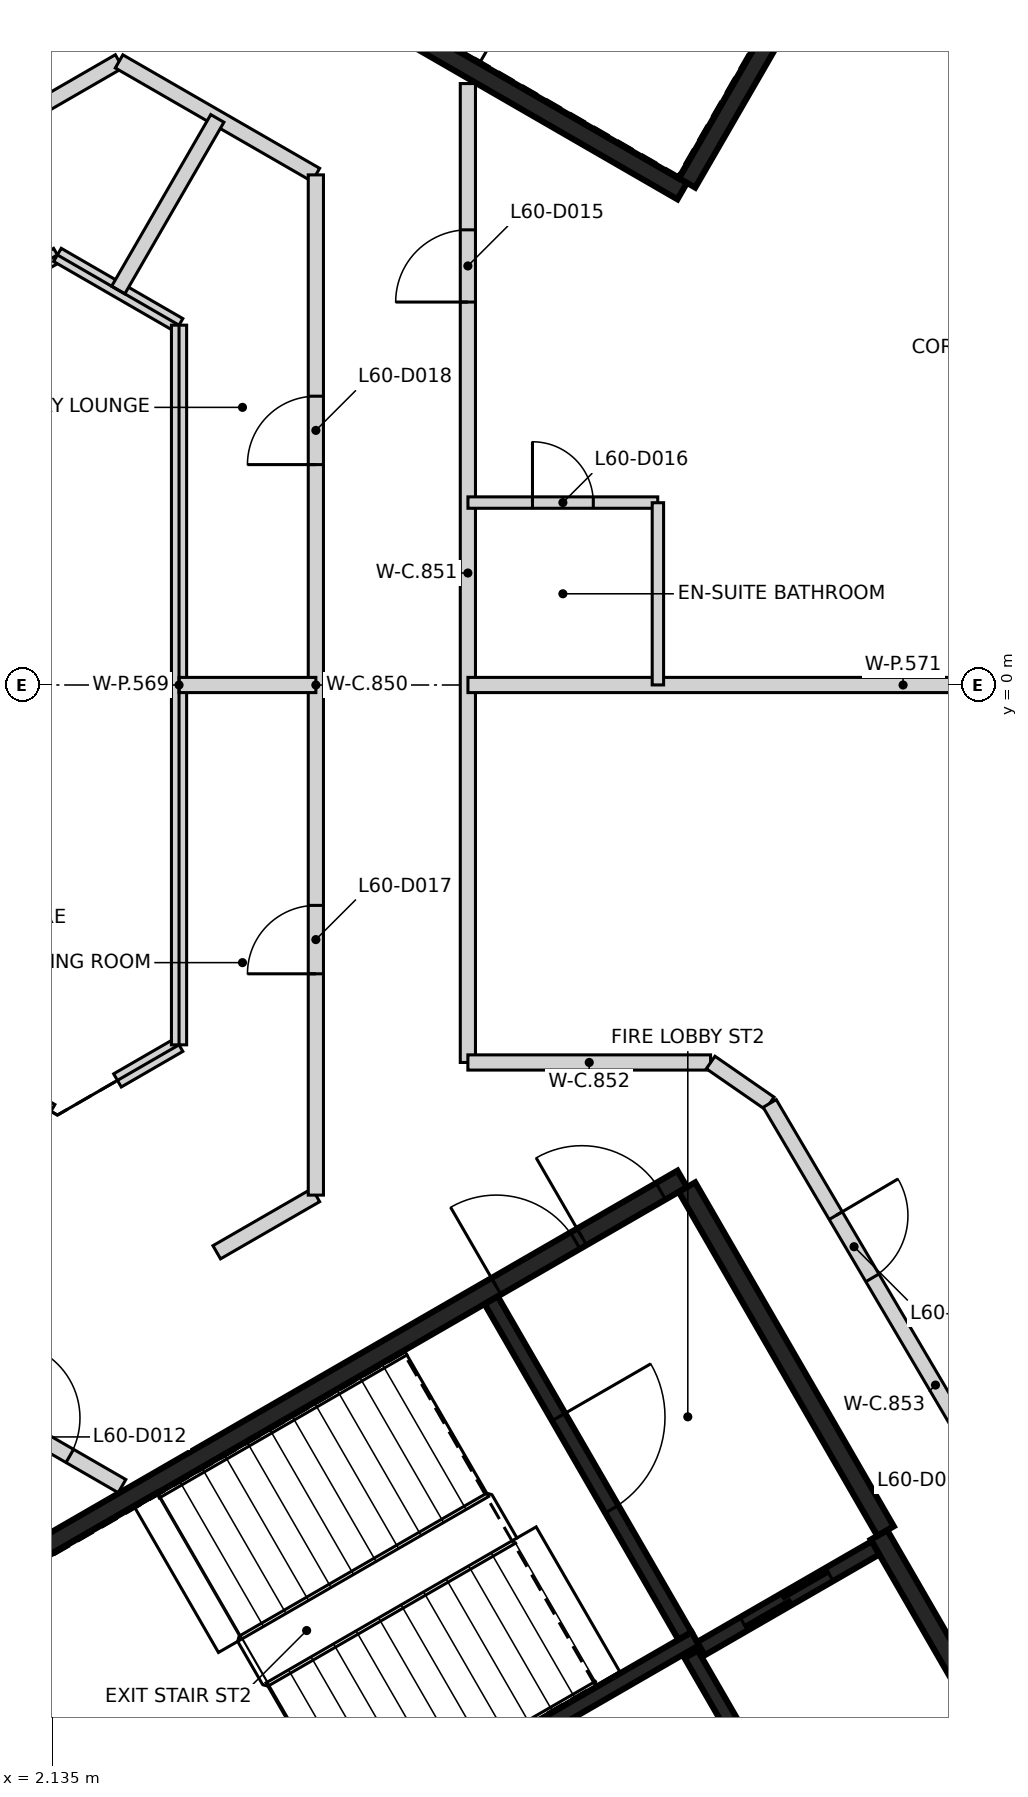
"""IFC4 building model, lengths in metres.
Left out: names, types, materials, properties, quantities, classifications, styles, units other than length and angle.
Written with IfcOpenShell. Run it as: python <this file> out.ifc"""

import sys

from ifc_helpers import new_model, si_unit, direction, frame, frame_2d, origin, place, context, subcontext, project, spatial, rectangle, extrude, element, fill, save


model = new_model("IFC4")
c1 = context("Model", 3, precision=1e-05, world=origin(), true_north=direction((0.0, 1.0)))
c2 = subcontext(c1, "Body", "Model", "MODEL_VIEW")
j1 = project(units=[si_unit("LENGTHUNIT", "METRE"), si_unit("PLANEANGLEUNIT", "RADIAN")], contexts=[c1])
p1 = place(None, origin())
s1 = spatial("IfcSite", under=j1, at=p1, CompositionType="ELEMENT")
p2 = place(p1, origin())
s2 = spatial("IfcBuilding", under=s1, at=p2, CompositionType="ELEMENT")
p3 = place(p2, frame((0.0, 0.0, 239.4)))
s3 = spatial("IfcBuildingStorey", under=s2, at=p3, CompositionType="ELEMENT", Elevation=239.4)
p4 = place(p3, frame((10.42, 6.498, 0.0), z_axis=(0.0, 0.0, 1.0), x_axis=(-0.866021906294, 0.500006057782, 0.0)))
e1 = element("IfcWall", 1, at=p4, inside=s3, PredefinedType="SHEAR", context=c2, shape_type="SweptSolid", body=[
    extrude(rectangle(XDim=11.55, YDim=0.25, at=frame_2d((5.775, 0.0))), origin(), (0.0, 0.0, 1.0), 3.25),
])
p5 = place(p4, frame((10.025, 0.0, 0.0)))
e2 = element("IfcOpeningElement", 2, at=p5, cuts=e1, PredefinedType="OPENING", context=c2, shape_type="SweptSolid", body=[
    extrude(rectangle(XDim=1.2, YDim=2.1, at=frame_2d((0.6, 1.05))), frame((0.0, 0.135, 0.0), z_axis=(0.0, -1.0, 0.0), x_axis=(1.0, 0.0, 0.0)), (0.0, 0.0, 1.0), 0.27),
])
p6 = place(p4, frame((8.725, 0.0, 0.0)))
e3 = element("IfcOpeningElement", 3, at=p6, cuts=e1, PredefinedType="OPENING", context=c2, shape_type="SweptSolid", body=[
    extrude(rectangle(XDim=1.2, YDim=2.1, at=frame_2d((0.6, 1.05))), frame((0.0, 0.135, 0.0), z_axis=(0.0, -1.0, 0.0), x_axis=(1.0, 0.0, 0.0)), (0.0, 0.0, 1.0), 0.27),
])
p7 = place(p3, frame((13.238, 11.378, 0.0), z_axis=(0.0, 0.0, 1.0), x_axis=(-0.500008851346, -0.866020293397, 0.0)))
e4 = element("IfcWall", 4, at=p7, inside=s3, PredefinedType="SHEAR", context=c2, shape_type="SweptSolid", body=[
    extrude(rectangle(XDim=5.51, YDim=0.25, at=frame_2d((2.755, 0.0))), origin(), (0.0, 0.0, 1.0), 3.25),
])
p8 = place(p3, frame((0.417, -12.273, 0.0), z_axis=(0.0, 0.0, 1.0), x_axis=(0.866021906294, 0.500006057782, 0.0)))
e5 = element("IfcWall", 5, at=p8, inside=s3, PredefinedType="SHEAR", context=c2, shape_type="SweptSolid", body=[
    extrude(rectangle(XDim=11.55, YDim=0.25, at=frame_2d((5.775, 0.0))), origin(), (0.0, 0.0, 1.0), 3.25),
])
p9 = place(p8, frame((10.025, 0.0, 0.0)))
e6 = element("IfcOpeningElement", 6, at=p9, cuts=e5, PredefinedType="OPENING", context=c2, shape_type="SweptSolid", body=[
    extrude(rectangle(XDim=1.2, YDim=2.1, at=frame_2d((0.6, 1.05))), frame((0.0, 0.135, 0.0), z_axis=(0.0, -1.0, 0.0), x_axis=(1.0, 0.0, 0.0)), (0.0, 0.0, 1.0), 0.27),
])
p10 = place(p8, frame((8.725, 0.0, 0.0)))
e7 = element("IfcOpeningElement", 7, at=p10, cuts=e5, PredefinedType="OPENING", context=c2, shape_type="SweptSolid", body=[
    extrude(rectangle(XDim=1.2, YDim=2.1, at=frame_2d((0.6, 1.05))), frame((0.0, 0.135, 0.0), z_axis=(0.0, -1.0, 0.0), x_axis=(1.0, 0.0, 0.0)), (0.0, 0.0, 1.0), 0.27),
])
p11 = place(p3, frame((13.008, -11.181, 0.0), z_axis=(0.0, 0.0, 1.0), x_axis=(0.500001955336, -0.866024274868, 0.0)))
e8 = element("IfcWall", 8, at=p11, inside=s3, PredefinedType="SHEAR", context=c2, shape_type="SweptSolid", body=[
    extrude(rectangle(XDim=6.125, YDim=0.25, at=frame_2d((3.062, 0.0))), origin(), (0.0, 0.0, 1.0), 3.25),
])
p12 = place(p11, frame((3.563, 0.0, 0.0)))
e9 = element("IfcOpeningElement", 9, at=p12, cuts=e8, PredefinedType="OPENING", context=c2, shape_type="SweptSolid", body=[
    extrude(rectangle(XDim=1.0, YDim=2.1, at=frame_2d((0.5, 1.05))), frame((0.0, 0.135, 0.0), z_axis=(0.0, -1.0, 0.0), x_axis=(1.0, 0.0, 0.0)), (0.0, 0.0, 1.0), 0.27),
])
p13 = place(p3, frame((3.235, -17.153, 0.0), z_axis=(0.0, 0.0, 1.0), x_axis=(-0.500008851346, 0.866020293397, 0.0)))
e10 = element("IfcWall", 10, at=p13, inside=s3, PredefinedType="SHEAR", context=c2, shape_type="SweptSolid", body=[
    extrude(rectangle(XDim=5.51, YDim=0.25, at=frame_2d((2.755, 0.0))), origin(), (0.0, 0.0, 1.0), 3.25),
])
p14 = place(p3, frame((10.483, -6.606, 0.0), z_axis=(0.0, 0.0, 1.0), x_axis=(0.49999885962, -0.866026062182, 0.0)))
e11 = element("IfcWall", 11, at=p14, inside=s3, PredefinedType="SHEAR", context=c2, shape_type="SweptSolid", body=[
    extrude(rectangle(XDim=5.225, YDim=0.25, at=frame_2d((2.612, 0.0))), origin(), (0.0, 0.0, 1.0), 3.25),
])
p15 = place(p3, frame((5.419, -15.534, 0.0), z_axis=(0.0, 0.0, 1.0), x_axis=(0.866029065029, 0.499993658486, 0.0)))
e12 = element("IfcWall", 12, at=p15, inside=s3, PredefinedType="SHEAR", context=c2, shape_type="SweptSolid", body=[
    extrude(rectangle(XDim=5.974, YDim=0.2, at=frame_2d((2.987, 0.0))), origin(), (0.0, 0.0, 1.0), 3.25),
])
p16 = place(p3, frame((7.906, -8.094, 0.0), z_axis=(0.0, 0.0, 1.0), x_axis=(0.500027839223, -0.866009330205, 0.0)))
e13 = element("IfcWall", 13, at=p16, inside=s3, PredefinedType="SHEAR", context=c2, shape_type="SweptSolid", body=[
    extrude(rectangle(XDim=5.098, YDim=0.2, at=frame_2d((2.549, 0.0))), origin(), (0.0, 0.0, 1.0), 3.25),
])
p17 = place(p16, frame((1.774, 0.0, 0.0)))
e14 = element("IfcOpeningElement", 14, at=p17, cuts=e13, PredefinedType="OPENING", context=c2, shape_type="SweptSolid", body=[
    extrude(rectangle(XDim=1.4, YDim=2.1, at=frame_2d((0.7, 1.05))), frame((0.0, 0.11, 0.0), z_axis=(0.0, -1.0, 0.0), x_axis=(1.0, 0.0, 0.0)), (0.0, 0.0, 1.0), 0.22),
])
p18 = place(p3, frame((12.088, -15.437, 0.0), z_axis=(0.0, 0.0, 1.0), x_axis=(-0.500026960575, 0.86600983753, 0.0)))
e15 = element("IfcWall", 15, at=p18, inside=s3, PredefinedType="SHEAR", context=c2, shape_type="SweptSolid", body=[
    extrude(rectangle(XDim=3.1, YDim=0.2, at=frame_2d((1.55, 0.0))), origin(), (0.0, 0.0, 1.0), 3.25),
])
p19 = place(p3, frame((10.666, -12.678, 0.0), z_axis=(0.0, 0.0, 1.0), x_axis=(0.866018407898, 0.500012117035, 0.0)))
e16 = element("IfcWall", 16, at=p19, inside=s3, PredefinedType="SHEAR", context=c2, shape_type="SweptSolid", body=[
    extrude(rectangle(XDim=2.651, YDim=0.2, at=frame_2d((1.325, 0.0))), origin(), (0.0, 0.0, 1.0), 3.25),
])
p20 = place(p19, frame((0.652, 0.0, 0.0)))
e17 = element("IfcOpeningElement", 17, at=p20, cuts=e16, PredefinedType="OPENING", context=c2, shape_type="SweptSolid", body=[
    extrude(rectangle(XDim=1.3, YDim=2.1, at=frame_2d((0.65, 1.05))), frame((0.0, 0.11, 0.0), z_axis=(0.0, -1.0, 0.0), x_axis=(1.0, 0.0, 0.0)), (0.0, 0.0, 1.0), 0.22),
])
p21 = place(p3, frame((-8.612, 1.494, 0.0), z_axis=(0.0, 0.0, 1.0), x_axis=(0.8660441356, 0.49996755414, 0.0)))
e18 = element("IfcWall", 18, at=p21, inside=s3, PredefinedType="PARTITIONING", context=c2, shape_type="SweptSolid", body=[
    extrude(rectangle(XDim=13.422, YDim=0.2, at=frame_2d((6.711, 0.0))), origin(), (0.0, 0.0, 1.0), 3.25),
])
p22 = place(p21, frame((9.611, 0.0, 0.0)))
e19 = element("IfcOpeningElement", 19, at=p22, cuts=e18, PredefinedType="OPENING", context=c2, shape_type="SweptSolid", body=[
    extrude(rectangle(XDim=0.9, YDim=2.1, at=frame_2d((0.45, 1.05))), frame((0.0, 0.11, 0.0), z_axis=(0.0, -1.0, 0.0), x_axis=(1.0, 0.0, 0.0)), (0.0, 0.0, 1.0), 0.22),
])
p23 = place(p21, frame((2.911, 0.0, 0.0)))
e20 = element("IfcOpeningElement", 20, at=p23, cuts=e18, PredefinedType="OPENING", context=c2, shape_type="SweptSolid", body=[
    extrude(rectangle(XDim=0.9, YDim=2.1, at=frame_2d((0.45, 1.05))), frame((0.0, 0.11, 0.0), z_axis=(0.0, -1.0, 0.0), x_axis=(1.0, 0.0, 0.0)), (0.0, 0.0, 1.0), 0.22),
])
p24 = place(p3, frame((-8.153, -4.069, 0.0), z_axis=(0.0, 0.0, 1.0), x_axis=(0.865955522833, -0.500121017829, 0.0)))
e21 = element("IfcWall", 21, at=p24, inside=s3, PredefinedType="PARTITIONING", context=c2, shape_type="SweptSolid", body=[
    extrude(rectangle(XDim=12.937, YDim=0.2, at=frame_2d((6.469, 0.0))), origin(), (0.0, 0.0, 1.0), 3.25),
])
p25 = place(p24, frame((3.337, 0.0, 0.0)))
e22 = element("IfcOpeningElement", 22, at=p25, cuts=e21, PredefinedType="OPENING", context=c2, shape_type="SweptSolid", body=[
    extrude(rectangle(XDim=1.0, YDim=2.1, at=frame_2d((0.5, 1.05))), frame((0.0, 0.11, 0.0), z_axis=(0.0, -1.0, 0.0), x_axis=(1.0, 0.0, 0.0)), (0.0, 0.0, 1.0), 0.22),
])
p26 = place(p24, frame((9.153, 0.0, 0.0)))
e23 = element("IfcOpeningElement", 23, at=p26, cuts=e21, PredefinedType="OPENING", context=c2, shape_type="SweptSolid", body=[
    extrude(rectangle(XDim=0.95, YDim=2.1, at=frame_2d((0.475, 1.05))), frame((0.0, 0.11, 0.0), z_axis=(0.0, -1.0, 0.0), x_axis=(1.0, 0.0, 0.0)), (0.0, 0.0, 1.0), 0.22),
])
p27 = place(p24, frame((11.144, 0.0, 0.0)))
e24 = element("IfcOpeningElement", 24, at=p27, cuts=e21, PredefinedType="OPENING", context=c2, shape_type="SweptSolid", body=[
    extrude(rectangle(XDim=1.0, YDim=2.1, at=frame_2d((0.5, 1.05))), frame((0.0, 0.11, 0.0), z_axis=(0.0, -1.0, 0.0), x_axis=(1.0, 0.0, 0.0)), (0.0, 0.0, 1.0), 0.22),
])
p28 = place(p3, frame((3.011, 8.204, 0.0), z_axis=(0.0, 0.0, 1.0), x_axis=(0.86628077395, -0.499557424812, 0.0)))
e25 = element("IfcWall", 25, at=p28, inside=s3, PredefinedType="PARTITIONING", context=c2, shape_type="SweptSolid", body=[
    extrude(rectangle(XDim=2.989, YDim=0.2, at=frame_2d((1.494, 0.0))), origin(), (0.0, 0.0, 1.0), 3.25),
])
p29 = place(p3, frame((4.296, -7.463, 0.0), z_axis=(0.0, 0.0, 1.0), x_axis=(0.86632054743, 0.499488447414, 0.0)))
e26 = element("IfcWall", 26, at=p29, inside=s3, PredefinedType="PARTITIONING", context=c2, shape_type="SweptSolid", body=[
    extrude(rectangle(XDim=1.505, YDim=0.2, at=frame_2d((0.753, 0.0))), origin(), (0.0, 0.0, 1.0), 3.25),
])
p30 = place(p3, frame((5.6, -6.711, 0.0), z_axis=(0.0, 0.0, 1.0), x_axis=(0.0, 1.0, 0.0)))
e27 = element("IfcWall", 27, at=p30, inside=s3, PredefinedType="PARTITIONING", context=c2, shape_type="SweptSolid", body=[
    extrude(rectangle(XDim=13.422, YDim=0.2, at=frame_2d((6.711, 0.0))), origin(), (0.0, 0.0, 1.0), 3.25),
])
p31 = place(p30, frame((2.912, 0.0, 0.0)))
e28 = element("IfcOpeningElement", 28, at=p31, cuts=e27, PredefinedType="OPENING", context=c2, shape_type="SweptSolid", body=[
    extrude(rectangle(XDim=0.9, YDim=2.1, at=frame_2d((0.45, 1.05))), frame((0.0, 0.11, 0.0), z_axis=(0.0, -1.0, 0.0), x_axis=(1.0, 0.0, 0.0)), (0.0, 0.0, 1.0), 0.22),
])
p32 = place(p30, frame((9.611, 0.0, 0.0)))
e29 = element("IfcOpeningElement", 29, at=p32, cuts=e27, PredefinedType="OPENING", context=c2, shape_type="SweptSolid", body=[
    extrude(rectangle(XDim=0.9, YDim=2.1, at=frame_2d((0.45, 1.05))), frame((0.0, 0.11, 0.0), z_axis=(0.0, -1.0, 0.0), x_axis=(1.0, 0.0, 0.0)), (0.0, 0.0, 1.0), 0.22),
])
p33 = place(p3, frame((7.6, -4.966, 0.0), z_axis=(0.0, 0.0, 1.0), x_axis=(0.0, 1.0, 0.0)))
e30 = element("IfcWall", 30, at=p33, inside=s3, PredefinedType="PARTITIONING", context=c2, shape_type="SweptSolid", body=[
    extrude(rectangle(XDim=12.878, YDim=0.2, at=frame_2d((6.439, 0.0))), origin(), (0.0, 0.0, 1.0), 3.25),
])
p34 = place(p33, frame((10.004, 0.0, 0.0)))
e31 = element("IfcOpeningElement", 31, at=p34, cuts=e30, PredefinedType="OPENING", context=c2, shape_type="SweptSolid", body=[
    extrude(rectangle(XDim=0.95, YDim=2.1, at=frame_2d((0.475, 1.05))), frame((0.0, 0.11, 0.0), z_axis=(0.0, -1.0, 0.0), x_axis=(1.0, 0.0, 0.0)), (0.0, 0.0, 1.0), 0.22),
])
p35 = place(p3, frame((7.6, -4.966, 0.0), z_axis=(0.0, 0.0, 1.0), x_axis=(1.0, 0.0, 0.0)))
e32 = element("IfcWall", 32, at=p35, inside=s3, PredefinedType="PARTITIONING", context=c2, shape_type="SweptSolid", body=[
    extrude(rectangle(XDim=3.193, YDim=0.2, at=frame_2d((1.596, 0.0))), origin(), (0.0, 0.0, 1.0), 3.25),
])
p36 = place(p3, frame((10.794, -4.966, 0.0), z_axis=(0.0, 0.0, 1.0), x_axis=(0.822266583859, -0.569102508401, 0.0)))
e33 = element("IfcWall", 33, at=p36, inside=s3, PredefinedType="PARTITIONING", context=c2, shape_type="SweptSolid", body=[
    extrude(rectangle(XDim=0.945, YDim=0.2, at=frame_2d((0.473, 0.0))), origin(), (0.0, 0.0, 1.0), 3.25),
])
p37 = place(p3, frame((11.571, -5.505, 0.0), z_axis=(0.0, 0.0, 1.0), x_axis=(0.507291838928, -0.861774326699, 0.0)))
e34 = element("IfcWall", 34, at=p37, inside=s3, PredefinedType="PARTITIONING", context=c2, shape_type="SweptSolid", body=[
    extrude(rectangle(XDim=8.599, YDim=0.2, at=frame_2d((4.299, 0.0))), origin(), (0.0, 0.0, 1.0), 3.25),
])
p38 = place(p37, frame((1.712, 0.0, 0.0)))
e35 = element("IfcOpeningElement", 35, at=p38, cuts=e34, PredefinedType="OPENING", context=c2, shape_type="SweptSolid", body=[
    extrude(rectangle(XDim=0.95, YDim=2.1, at=frame_2d((0.475, 1.05))), frame((0.0, 0.11, 0.0), z_axis=(0.0, -1.0, 0.0), x_axis=(1.0, 0.0, 0.0)), (0.0, 0.0, 1.0), 0.22),
])
p39 = place(p3, frame((-6.0, -0.924, 0.0), z_axis=(0.0, 0.0, 1.0), x_axis=(0.866223755075, -0.499656288007, 0.0)))
e36 = element("IfcWall", 36, at=p39, inside=s3, PredefinedType="PARTITIONING", context=c2, shape_type="SweptSolid", body=[
    extrude(rectangle(XDim=9.37, YDim=0.2, at=frame_2d((4.685, 0.0))), origin(), (0.0, 0.0, 1.0), 3.25),
])
p40 = place(p3, frame((-6.0, 0.924, 0.0), z_axis=(0.0, 0.0, 1.0), x_axis=(0.866012967051, 0.500021540435, 0.0)))
e37 = element("IfcWall", 37, at=p40, inside=s3, PredefinedType="PARTITIONING", context=c2, shape_type="SweptSolid", body=[
    extrude(rectangle(XDim=9.468, YDim=0.2, at=frame_2d((4.734, 0.0))), origin(), (0.0, 0.0, 1.0), 3.25),
])
p41 = place(p3, frame((2.2, 5.658, 0.0), z_axis=(0.0, 0.0, 1.0), x_axis=(0.865818011038, -0.500359042851, 0.0)))
e38 = element("IfcWall", 38, at=p41, inside=s3, PredefinedType="PARTITIONING", context=c2, shape_type="SweptSolid", body=[
    extrude(rectangle(XDim=1.848, YDim=0.2, at=frame_2d((0.924, 0.0))), origin(), (0.0, 0.0, 1.0), 3.25),
])
p42 = place(p3, frame((2.99, -5.202, 0.0), z_axis=(0.0, 0.0, 1.0), x_axis=(0.865872609263, 0.500264554538, 0.0)))
e39 = element("IfcWall", 39, at=p42, inside=s3, PredefinedType="PARTITIONING", context=c2, shape_type="SweptSolid", body=[
    extrude(rectangle(XDim=0.936, YDim=0.2, at=frame_2d((0.468, 0.0))), origin(), (0.0, 0.0, 1.0), 3.25),
])
p43 = place(p3, frame((3.0, 5.196, 0.0), z_axis=(0.0, 0.0, 1.0), x_axis=(0.500076354988, 0.865981315724, 0.0)))
e40 = element("IfcWall", 40, at=p43, inside=s3, PredefinedType="PARTITIONING", context=c2, shape_type="SweptSolid", body=[
    extrude(rectangle(XDim=2.607, YDim=0.2, at=frame_2d((1.304, 0.0))), origin(), (0.0, 0.0, 1.0), 3.25),
])
p44 = place(p3, frame((3.8, -4.734, 0.0), z_axis=(0.0, 0.0, 1.0), x_axis=(0.0, 1.0, 0.0)))
e41 = element("IfcWall", 41, at=p44, inside=s3, PredefinedType="PARTITIONING", context=c2, shape_type="SweptSolid", body=[
    extrude(rectangle(XDim=9.468, YDim=0.2, at=frame_2d((4.734, 0.0))), origin(), (0.0, 0.0, 1.0), 3.25),
])
p45 = place(p3, frame((3.8, 0.0, 0.0), z_axis=(0.0, 0.0, 1.0), x_axis=(1.0, 0.0, 0.0)))
e42 = element("IfcWall", 42, at=p45, inside=s3, PredefinedType="PARTITIONING", context=c2, shape_type="SweptSolid", body=[
    extrude(rectangle(XDim=1.8, YDim=0.2, at=frame_2d((0.9, 0.0))), origin(), (0.0, 0.0, 1.0), 3.25),
])
p46 = place(p3, frame((7.601, 0.0, 0.0), z_axis=(0.0, 0.0, 1.0), x_axis=(1.0, 0.0, 0.0)))
e43 = element("IfcWall", 43, at=p46, inside=s3, PredefinedType="PARTITIONING", context=c2, shape_type="SweptSolid", body=[
    extrude(rectangle(XDim=11.449, YDim=0.2, at=frame_2d((5.725, 0.0))), origin(), (0.0, 0.0, 1.0), 3.25),
])
p47 = place(p3, frame((7.601, 2.4, 0.0), z_axis=(0.0, 0.0, 1.0), x_axis=(1.0, 0.0, 0.0)))
e44 = element("IfcWall", 44, at=p47, inside=s3, PredefinedType="PARTITIONING", context=c2, shape_type="SweptSolid", body=[
    extrude(rectangle(XDim=2.497, YDim=0.15, at=frame_2d((1.249, 0.0))), origin(), (0.0, 0.0, 1.0), 3.25),
])
p48 = place(p47, frame((0.849, 0.0, 0.0)))
e45 = element("IfcOpeningElement", 45, at=p48, cuts=e44, PredefinedType="OPENING", context=c2, shape_type="SweptSolid", body=[
    extrude(rectangle(XDim=0.8, YDim=2.1, at=frame_2d((0.4, 1.05))), frame((0.0, 0.085, 0.0), z_axis=(0.0, -1.0, 0.0), x_axis=(1.0, 0.0, 0.0)), (0.0, 0.0, 1.0), 0.17),
])
p49 = place(p3, frame((10.1, 0.001, 0.0), z_axis=(0.0, 0.0, 1.0), x_axis=(0.0, 1.0, 0.0)))
e46 = element("IfcWall", 46, at=p49, inside=s3, PredefinedType="PARTITIONING", context=c2, shape_type="SweptSolid", body=[
    extrude(rectangle(XDim=2.397, YDim=0.15, at=frame_2d((1.198, 0.0))), origin(), (0.0, 0.0, 1.0), 3.25),
])
p50 = place(p20, origin())
e47 = element("IfcDoor", 47, at=p50, inside=s3, OperationType="SLIDING_TO_RIGHT", PredefinedType="DOOR", context=c2, shape_type="SweptSolid", body=[
    extrude(rectangle(XDim=1.3, YDim=2.1, at=frame_2d((0.65, 1.05))), frame((0.0, 0.025, 0.0), z_axis=(0.0, -1.0, 0.0), x_axis=(1.0, 0.0, 0.0)), (0.0, 0.0, 1.0), 0.05),
])
fill(e17, e47)
p51 = place(p9, origin())
e48 = element("IfcDoor", 48, at=p51, inside=s3, OperationType="SINGLE_SWING_LEFT", PredefinedType="DOOR", context=c2, shape_type="SweptSolid", body=[
    extrude(rectangle(XDim=1.2, YDim=2.1, at=frame_2d((0.6, 1.05))), frame((0.0, 0.025, 0.0), z_axis=(0.0, -1.0, 0.0), x_axis=(1.0, 0.0, 0.0)), (0.0, 0.0, 1.0), 0.05),
])
fill(e6, e48)
p52 = place(p10, origin())
e49 = element("IfcDoor", 49, at=p52, inside=s3, OperationType="SINGLE_SWING_RIGHT", PredefinedType="DOOR", context=c2, shape_type="SweptSolid", body=[
    extrude(rectangle(XDim=1.2, YDim=2.1, at=frame_2d((0.6, 1.05))), frame((0.0, 0.025, 0.0), z_axis=(0.0, -1.0, 0.0), x_axis=(1.0, 0.0, 0.0)), (0.0, 0.0, 1.0), 0.05),
])
fill(e7, e49)
p53 = place(p17, origin())
e50 = element("IfcDoor", 50, at=p53, inside=s3, OperationType="SINGLE_SWING_RIGHT", PredefinedType="DOOR", context=c2, shape_type="SweptSolid", body=[
    extrude(rectangle(XDim=1.4, YDim=2.1, at=frame_2d((0.7, 1.05))), frame((0.0, 0.025, 0.0), z_axis=(0.0, -1.0, 0.0), x_axis=(1.0, 0.0, 0.0)), (0.0, 0.0, 1.0), 0.05),
])
fill(e14, e50)
p54 = place(p27, frame((1.0, 0.0, 0.0), z_axis=(0.0, 0.0, 1.0), x_axis=(-1.0, 0.0, 0.0)))
e51 = element("IfcDoor", 51, at=p54, inside=s3, OperationType="SINGLE_SWING_LEFT", PredefinedType="DOOR", context=c2, shape_type="SweptSolid", body=[
    extrude(rectangle(XDim=1.0, YDim=2.1, at=frame_2d((0.5, 1.05))), frame((0.0, 0.025, 0.0), z_axis=(0.0, -1.0, 0.0), x_axis=(1.0, 0.0, 0.0)), (0.0, 0.0, 1.0), 0.05),
])
fill(e24, e51)
p55 = place(p38, origin())
e52 = element("IfcDoor", 52, at=p55, inside=s3, OperationType="SINGLE_SWING_LEFT", PredefinedType="DOOR", context=c2, shape_type="SweptSolid", body=[
    extrude(rectangle(XDim=0.95, YDim=2.1, at=frame_2d((0.475, 1.05))), frame((0.0, 0.025, 0.0), z_axis=(0.0, -1.0, 0.0), x_axis=(1.0, 0.0, 0.0)), (0.0, 0.0, 1.0), 0.05),
])
fill(e35, e52)
p56 = place(p34, frame((0.95, 0.0, 0.0), z_axis=(0.0, 0.0, 1.0), x_axis=(-1.0, 0.0, 0.0)))
e53 = element("IfcDoor", 53, at=p56, inside=s3, OperationType="SINGLE_SWING_LEFT", PredefinedType="DOOR", context=c2, shape_type="SweptSolid", body=[
    extrude(rectangle(XDim=0.95, YDim=2.1, at=frame_2d((0.475, 1.05))), frame((0.0, 0.025, 0.0), z_axis=(0.0, -1.0, 0.0), x_axis=(1.0, 0.0, 0.0)), (0.0, 0.0, 1.0), 0.05),
])
fill(e31, e53)
p57 = place(p48, origin())
e54 = element("IfcDoor", 54, at=p57, inside=s3, OperationType="SINGLE_SWING_LEFT", PredefinedType="DOOR", context=c2, shape_type="SweptSolid", body=[
    extrude(rectangle(XDim=0.8, YDim=2.1, at=frame_2d((0.4, 1.05))), frame((0.0, 0.025, 0.0), z_axis=(0.0, -1.0, 0.0), x_axis=(1.0, 0.0, 0.0)), (0.0, 0.0, 1.0), 0.05),
])
fill(e45, e54)
p58 = place(p31, origin())
e55 = element("IfcDoor", 55, at=p58, inside=s3, OperationType="SINGLE_SWING_LEFT", PredefinedType="DOOR", context=c2, shape_type="SweptSolid", body=[
    extrude(rectangle(XDim=0.9, YDim=2.1, at=frame_2d((0.45, 1.05))), frame((0.0, 0.025, 0.0), z_axis=(0.0, -1.0, 0.0), x_axis=(1.0, 0.0, 0.0)), (0.0, 0.0, 1.0), 0.05),
])
fill(e28, e55)
p59 = place(p32, origin())
e56 = element("IfcDoor", 56, at=p59, inside=s3, OperationType="SINGLE_SWING_LEFT", PredefinedType="DOOR", context=c2, shape_type="SweptSolid", body=[
    extrude(rectangle(XDim=0.9, YDim=2.1, at=frame_2d((0.45, 1.05))), frame((0.0, 0.025, 0.0), z_axis=(0.0, -1.0, 0.0), x_axis=(1.0, 0.0, 0.0)), (0.0, 0.0, 1.0), 0.05),
])
fill(e29, e56)
save(model, sys.argv[1])
